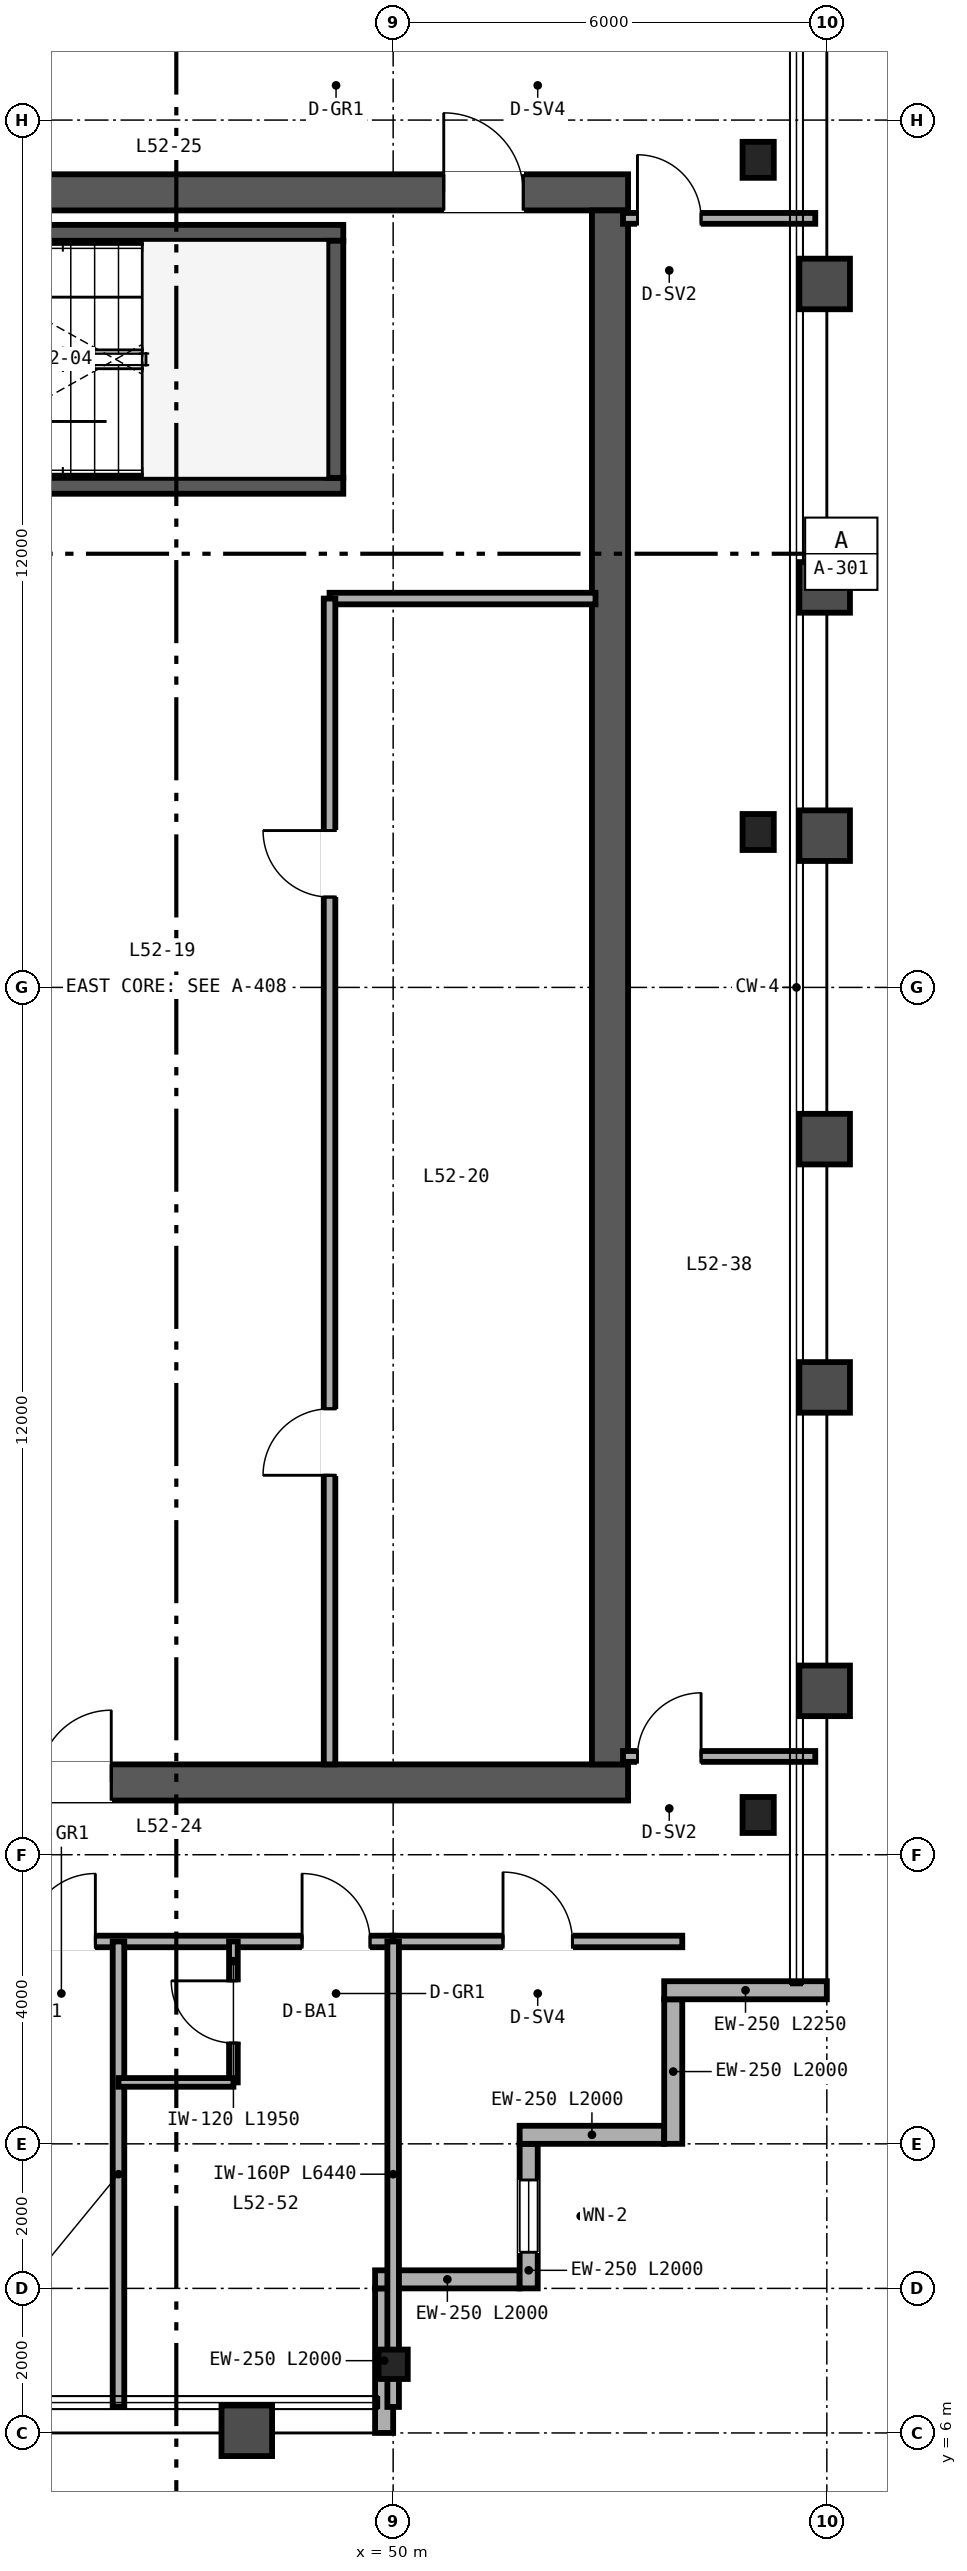
"""IFC4 building model, lengths in metres.
Left out: names, types, materials, properties, quantities, classifications, styles, units other than length and angle.
Written with IfcOpenShell. Run it as: python <this file> out.ifc"""

import sys

from ifc_helpers import new_model, si_unit, direction, frame, frame_2d, origin, origin_2d, place, context, subcontext, project, spatial, rectangle, i_section, extrude, source, transform, mapped, element, fill, save


model = new_model("IFC4")
c1 = context("Model", 3, precision=1e-05, world=origin(), true_north=direction((0.0, 1.0)))
c2 = subcontext(c1, "Body", "Model", "MODEL_VIEW")
j1 = project(units=[si_unit("LENGTHUNIT", "METRE"), si_unit("PLANEANGLEUNIT", "RADIAN")], contexts=[c1])
p1 = place(None, origin())
s1 = spatial("IfcSite", under=j1, at=p1, CompositionType="ELEMENT")
p2 = place(p1, origin())
s2 = spatial("IfcBuilding", under=s1, at=p2, CompositionType="ELEMENT")
p3 = place(p2, frame((0.0, 0.0, 206.4)))
s3 = spatial("IfcBuildingStorey", under=s2, at=p3, CompositionType="ELEMENT", Elevation=206.4)
p4 = place(p3, frame((40.75, 15.0, 0.0), z_axis=(0.0, 0.0, 1.0), x_axis=(1.0, 0.0, 0.0)))
e1 = element("IfcWall", 1, at=p4, inside=s3, PredefinedType="SHEAR", context=c2, shape_type="SweptSolid", body=[
    extrude(rectangle(XDim=12.5, YDim=0.5, at=frame_2d((6.25, 0.0))), origin(), (0.0, 0.0, 1.0), 3.37),
])
p5 = place(p4, frame((4.35, 0.0, 0.0)))
e2 = element("IfcOpeningElement", 2, at=p5, cuts=e1, PredefinedType="OPENING", context=c2, shape_type="SweptSolid", body=[
    extrude(rectangle(XDim=1.0, YDim=2.15, at=frame_2d((0.5, 1.075))), frame((0.0, 0.26, 0.0), z_axis=(0.0, -1.0, 0.0), x_axis=(1.0, 0.0, 0.0)), (0.0, 0.0, 1.0), 0.52),
])
p6 = place(p3, frame((40.75, 37.0, 0.0), z_axis=(0.0, 0.0, 1.0), x_axis=(1.0, 0.0, 0.0)))
e3 = element("IfcWall", 3, at=p6, inside=s3, PredefinedType="SHEAR", context=c2, shape_type="SweptSolid", body=[
    extrude(rectangle(XDim=12.5, YDim=0.5, at=frame_2d((6.25, 0.0))), origin(), (0.0, 0.0, 1.0), 3.37),
])
p7 = place(p6, frame((9.95, 0.0, 0.0)))
e4 = element("IfcOpeningElement", 4, at=p7, cuts=e3, PredefinedType="OPENING", context=c2, shape_type="SweptSolid", body=[
    extrude(rectangle(XDim=1.1, YDim=2.15, at=frame_2d((0.55, 1.075))), frame((0.0, 0.26, 0.0), z_axis=(0.0, -1.0, 0.0), x_axis=(1.0, 0.0, 0.0)), (0.0, 0.0, 1.0), 0.52),
])
p8 = place(p3, frame((53.0, 15.25, 0.0), z_axis=(0.0, 0.0, 1.0), x_axis=(0.0, 1.0, 0.0)))
e5 = element("IfcWall", 5, at=p8, inside=s3, PredefinedType="SHEAR", context=c2, shape_type="SweptSolid", body=[
    extrude(rectangle(XDim=21.5, YDim=0.5, at=frame_2d((10.75, 0.0))), origin(), (0.0, 0.0, 1.0), 3.37),
])
p9 = place(p3, frame((41.25, 32.94, 0.0), z_axis=(0.0, 0.0, 1.0), x_axis=(1.0, 0.0, 0.0)))
e6 = element("IfcWall", 6, at=p9, inside=s3, PredefinedType="SHEAR", context=c2, shape_type="SweptSolid", body=[
    extrude(rectangle(XDim=8.06, YDim=0.22, at=frame_2d((4.03, 0.0))), origin(), (0.0, 0.0, 1.0), 3.4),
])
p10 = place(p9, frame((0.67, 0.0, 0.0)))
e7 = element("IfcOpeningElement", 7, at=p10, cuts=e6, PredefinedType="OPENING", context=c2, shape_type="SweptSolid", body=[
    extrude(rectangle(XDim=1.05, YDim=2.15, at=frame_2d((0.525, 1.075))), frame((0.0, 0.12, 0.0), z_axis=(0.0, -1.0, 0.0), x_axis=(1.0, 0.0, 0.0)), (0.0, 0.0, 1.0), 0.24),
])
p11 = place(p3, frame((41.25, 36.44, 0.0), z_axis=(0.0, 0.0, 1.0), x_axis=(1.0, 0.0, 0.0)))
e8 = element("IfcWall", 8, at=p11, inside=s3, PredefinedType="SHEAR", context=c2, shape_type="SweptSolid", body=[
    extrude(rectangle(XDim=8.06, YDim=0.22, at=frame_2d((4.03, 0.0))), origin(), (0.0, 0.0, 1.0), 3.4),
])
p12 = place(p3, frame((49.2, 33.05, 0.0), z_axis=(0.0, 0.0, 1.0), x_axis=(0.0, 1.0, 0.0)))
e9 = element("IfcWall", 9, at=p12, inside=s3, PredefinedType="SHEAR", context=c2, shape_type="SweptSolid", body=[
    extrude(rectangle(XDim=3.28, YDim=0.22, at=frame_2d((1.64, 0.0))), origin(), (0.0, 0.0, 1.0), 3.4),
])
m1 = source(origin(), c2, "Body", "SweptSolid", [
    extrude(i_section(OverallWidth=0.432, OverallDepth=0.498, WebThickness=0.056, FlangeThickness=0.089, FilletRadius=0.025, at=origin_2d()), origin(), (0.0, 0.0, 1.0), 3.37),
])
for number, where, z_axis, x_axis in (
    (10, (55.05, 14.55, 0.0), (0.0, 0.0, 1.0), (1.0, 0.0, 0.0)),
    (11, (55.05, 28.15, 0.0), (0.0, 0.0, 1.0), (1.0, 0.0, 0.0)),
    (12, (55.05, 37.45, 0.0), (0.0, 0.0, 1.0), (1.0, 0.0, 0.0)),
):
    element("IfcColumn", number, at=place(p3, frame(where, z_axis=z_axis, x_axis=x_axis)), inside=s3, PredefinedType="COLUMN", context=c2, shape_type="MappedRepresentation", body=[
        mapped(m1, transform((0.0, 0.0, 0.0), scale=1.0)),
    ])
m2 = source(origin(), c2, "Body", "SweptSolid", [
    extrude(i_section(OverallWidth=0.404, OverallDepth=0.407, WebThickness=0.027, FlangeThickness=0.044, FilletRadius=0.025, at=origin_2d()), origin(), (0.0, 0.0, 1.0), 3.37),
])
p13 = place(p3, frame((50.0, 6.95, 0.0), z_axis=(0.0, 0.0, 1.0), x_axis=(1.0, 0.0, 0.0)))
e13 = element("IfcColumn", 13, at=p13, inside=s3, PredefinedType="COLUMN", context=c2, shape_type="MappedRepresentation", body=[
    mapped(m2, transform((0.0, 0.0, 0.0), scale=1.0)),
])
p14 = place(p3, frame((49.875, 6.0, 0.0), z_axis=(0.0, 0.0, 1.0), x_axis=(0.0, 1.0, 0.0)))
e14 = element("IfcWall", 14, at=p14, inside=s3, PredefinedType="SOLIDWALL", context=c2, shape_type="SweptSolid", body=[
    extrude(rectangle(XDim=2.0, YDim=0.25, at=frame_2d((1.0, 0.0))), origin(), (0.0, 0.0, 1.0), 2.677),
])
p15 = place(p3, frame((49.75, 8.125, 0.0), z_axis=(0.0, 0.0, 1.0), x_axis=(1.0, 0.0, 0.0)))
e15 = element("IfcWall", 15, at=p15, inside=s3, PredefinedType="SOLIDWALL", context=c2, shape_type="SweptSolid", body=[
    extrude(rectangle(XDim=2.0, YDim=0.25, at=frame_2d((1.0, 0.0))), origin(), (0.0, 0.0, 1.0), 3.37),
])
p16 = place(p3, frame((51.875, 8.0, 0.0), z_axis=(0.0, 0.0, 1.0), x_axis=(0.0, 1.0, 0.0)))
e16 = element("IfcWall", 16, at=p16, inside=s3, PredefinedType="SOLIDWALL", context=c2, shape_type="SweptSolid", body=[
    extrude(rectangle(XDim=2.0, YDim=0.25, at=frame_2d((1.0, 0.0))), origin(), (0.0, 0.0, 1.0), 3.37),
])
p17 = place(p16, frame((0.5, 0.0, 0.85)))
e17 = element("IfcOpeningElement", 17, at=p17, cuts=e16, PredefinedType="OPENING", context=c2, shape_type="SweptSolid", body=[
    extrude(rectangle(XDim=1.0, YDim=1.9, at=frame_2d((0.5, 0.95))), frame((0.0, 0.135, 0.0), z_axis=(0.0, -1.0, 0.0), x_axis=(1.0, 0.0, 0.0)), (0.0, 0.0, 1.0), 0.27),
])
for number, where, z_axis, x_axis in (
    (18, (51.75, 10.125, 0.0), (0.0, 0.0, 1.0), (1.0, 0.0, 0.0)),
    (19, (53.875, 10.0, 0.0), (0.0, 0.0, 1.0), (0.0, 1.0, 0.0)),
):
    element("IfcWall", number, at=place(p3, frame(where, z_axis=z_axis, x_axis=x_axis)), inside=s3, PredefinedType="SOLIDWALL", context=c2, shape_type="SweptSolid", body=[
        extrude(rectangle(XDim=2.0, YDim=0.25, at=frame_2d((1.0, 0.0))), origin(), (0.0, 0.0, 1.0), 3.37),
    ])
p18 = place(p3, frame((53.75, 12.125, 0.0), z_axis=(0.0, 0.0, 1.0), x_axis=(1.0, 0.0, 0.0)))
e20 = element("IfcWall", 20, at=p18, inside=s3, PredefinedType="SOLIDWALL", context=c2, shape_type="SweptSolid", body=[
    extrude(rectangle(XDim=2.25, YDim=0.25, at=frame_2d((1.125, 0.0))), origin(), (0.0, 0.0, 1.0), 3.37),
])
p19 = place(p3, frame((49.12, 31.38, 0.0), z_axis=(0.0, 0.0, 1.0), x_axis=(1.0, 0.0, 0.0)))
e21 = element("IfcWall", 21, at=p19, inside=s3, PredefinedType="PARTITIONING", context=c2, shape_type="SweptSolid", body=[
    extrude(rectangle(XDim=3.68, YDim=0.16, at=frame_2d((1.84, 0.0))), origin(), (0.0, 0.0, 1.0), 2.47),
])
p20 = place(p3, frame((49.12, 15.25, 0.0), z_axis=(0.0, 0.0, 1.0), x_axis=(0.0, 1.0, 0.0)))
e22 = element("IfcWall", 22, at=p20, inside=s3, PredefinedType="PARTITIONING", context=c2, shape_type="SweptSolid", body=[
    extrude(rectangle(XDim=16.13, YDim=0.16, at=frame_2d((8.065, 0.0))), origin(), (0.0, 0.0, 1.0), 2.443),
])
p21 = place(p20, frame((4.0, 0.0, 0.0)))
e23 = element("IfcOpeningElement", 23, at=p21, cuts=e22, PredefinedType="OPENING", context=c2, shape_type="SweptSolid", body=[
    extrude(rectangle(XDim=0.92, YDim=2.15, at=frame_2d((0.46, 1.075))), frame((0.0, 0.09, 0.0), z_axis=(0.0, -1.0, 0.0), x_axis=(1.0, 0.0, 0.0)), (0.0, 0.0, 1.0), 0.18),
])
p22 = place(p20, frame((12.0, 0.0, 0.0)))
e24 = element("IfcOpeningElement", 24, at=p22, cuts=e22, PredefinedType="OPENING", context=c2, shape_type="SweptSolid", body=[
    extrude(rectangle(XDim=0.92, YDim=2.15, at=frame_2d((0.46, 1.075))), frame((0.0, 0.09, 0.0), z_axis=(0.0, -1.0, 0.0), x_axis=(1.0, 0.0, 0.0)), (0.0, 0.0, 1.0), 0.18),
])
p23 = place(p3, frame((53.18, 15.36, 0.0), z_axis=(0.0, 0.0, 1.0), x_axis=(1.0, 0.0, 0.0)))
e25 = element("IfcWall", 25, at=p23, inside=s3, PredefinedType="PARTITIONING", context=c2, shape_type="SweptSolid", body=[
    extrude(rectangle(XDim=2.66, YDim=0.15, at=frame_2d((1.33, 0.0))), origin(), (0.0, 0.0, 1.0), 2.591),
])
p24 = place(p23, frame((0.2, 0.0, 0.0)))
e26 = element("IfcOpeningElement", 26, at=p24, cuts=e25, PredefinedType="OPENING", context=c2, shape_type="SweptSolid", body=[
    extrude(rectangle(XDim=0.88, YDim=2.15, at=frame_2d((0.44, 1.075))), frame((0.0, 0.085, 0.0), z_axis=(0.0, -1.0, 0.0), x_axis=(1.0, 0.0, 0.0)), (0.0, 0.0, 1.0), 0.17),
])
p25 = place(p3, frame((53.18, 36.64, 0.0), z_axis=(0.0, 0.0, 1.0), x_axis=(1.0, 0.0, 0.0)))
e27 = element("IfcWall", 27, at=p25, inside=s3, PredefinedType="PARTITIONING", context=c2, shape_type="SweptSolid", body=[
    extrude(rectangle(XDim=2.66, YDim=0.15, at=frame_2d((1.33, 0.0))), origin(), (0.0, 0.0, 1.0), 2.753),
])
p26 = place(p25, frame((0.2, 0.0, 0.0)))
e28 = element("IfcOpeningElement", 28, at=p26, cuts=e27, PredefinedType="OPENING", context=c2, shape_type="SweptSolid", body=[
    extrude(rectangle(XDim=0.88, YDim=2.15, at=frame_2d((0.44, 1.075))), frame((0.0, 0.085, 0.0), z_axis=(0.0, -1.0, 0.0), x_axis=(1.0, 0.0, 0.0)), (0.0, 0.0, 1.0), 0.17),
])
p27 = place(p3, frame((50.0, 12.8, 0.0), z_axis=(0.0, 0.0, 1.0), x_axis=(1.0, 0.0, 0.0)))
e29 = element("IfcWall", 29, at=p27, inside=s3, PredefinedType="PARTITIONING", context=c2, shape_type="SweptSolid", body=[
    extrude(rectangle(XDim=4.0, YDim=0.16, at=frame_2d((2.0, 0.0))), origin(), (0.0, 0.0, 1.0), 3.37),
])
p28 = place(p27, frame((1.52, 0.0, 0.0)))
e30 = element("IfcOpeningElement", 30, at=p28, cuts=e29, PredefinedType="OPENING", context=c2, shape_type="SweptSolid", body=[
    extrude(rectangle(XDim=0.96, YDim=2.15, at=frame_2d((0.48, 1.075))), frame((0.0, 0.09, 0.0), z_axis=(0.0, -1.0, 0.0), x_axis=(1.0, 0.0, 0.0)), (0.0, 0.0, 1.0), 0.18),
])
p29 = place(p3, frame((38.0, 12.8, 0.0), z_axis=(0.0, 0.0, 1.0), x_axis=(1.0, 0.0, 0.0)))
e31 = element("IfcWall", 31, at=p29, inside=s3, PredefinedType="PARTITIONING", context=c2, shape_type="SweptSolid", body=[
    extrude(rectangle(XDim=12.0, YDim=0.16, at=frame_2d((6.0, 0.0))), origin(), (0.0, 0.0, 1.0), 2.913),
])
p30 = place(p29, frame((3.14, 0.0, 0.0)))
e32 = element("IfcOpeningElement", 32, at=p30, cuts=e31, PredefinedType="OPENING", context=c2, shape_type="SweptSolid", body=[
    extrude(rectangle(XDim=0.94, YDim=2.15, at=frame_2d((0.47, 1.075))), frame((0.0, 0.09, 0.0), z_axis=(0.0, -1.0, 0.0), x_axis=(1.0, 0.0, 0.0)), (0.0, 0.0, 1.0), 0.18),
])
p31 = place(p29, frame((6.94, 0.0, 0.0)))
e33 = element("IfcOpeningElement", 33, at=p31, cuts=e31, PredefinedType="OPENING", context=c2, shape_type="SweptSolid", body=[
    extrude(rectangle(XDim=0.94, YDim=2.15, at=frame_2d((0.47, 1.075))), frame((0.0, 0.09, 0.0), z_axis=(0.0, -1.0, 0.0), x_axis=(1.0, 0.0, 0.0)), (0.0, 0.0, 1.0), 0.18),
])
p32 = place(p29, frame((10.74, 0.0, 0.0)))
e34 = element("IfcOpeningElement", 34, at=p32, cuts=e31, PredefinedType="OPENING", context=c2, shape_type="SweptSolid", body=[
    extrude(rectangle(XDim=0.94, YDim=2.15, at=frame_2d((0.47, 1.075))), frame((0.0, 0.09, 0.0), z_axis=(0.0, -1.0, 0.0), x_axis=(1.0, 0.0, 0.0)), (0.0, 0.0, 1.0), 0.18),
])
for number, where, z_axis, x_axis in (
    (35, (50.0, 6.36, 0.0), (0.0, 0.0, 1.0), (0.0, 1.0, 0.0)),
    (36, (46.2, 6.36, 0.0), (0.0, 0.0, 1.0), (0.0, 1.0, 0.0)),
):
    element("IfcWall", number, at=place(p3, frame(where, z_axis=z_axis, x_axis=x_axis)), inside=s3, PredefinedType="PARTITIONING", context=c2, shape_type="SweptSolid", body=[
        extrude(rectangle(XDim=6.44, YDim=0.16, at=frame_2d((3.22, 0.0))), origin(), (0.0, 0.0, 1.0), 2.677),
    ])
p33 = place(p3, frame((47.79, 10.85, 0.0), z_axis=(0.0, 0.0, 1.0), x_axis=(0.0, 1.0, 0.0)))
e37 = element("IfcWall", 37, at=p33, inside=s3, PredefinedType="PARTITIONING", context=c2, shape_type="SweptSolid", body=[
    extrude(rectangle(XDim=1.95, YDim=0.12, at=frame_2d((0.975, 0.0))), origin(), (0.0, 0.0, 1.0), 3.37),
])
p34 = place(p33, frame((0.545, 0.0, 0.0)))
e38 = element("IfcOpeningElement", 38, at=p34, cuts=e37, PredefinedType="OPENING", context=c2, shape_type="SweptSolid", body=[
    extrude(rectangle(XDim=0.86, YDim=2.1, at=frame_2d((0.43, 1.05))), frame((0.0, 0.07, 0.0), z_axis=(0.0, -1.0, 0.0), x_axis=(1.0, 0.0, 0.0)), (0.0, 0.0, 1.0), 0.14),
])
p35 = place(p3, frame((46.2, 10.85, 0.0), z_axis=(0.0, 0.0, 1.0), x_axis=(1.0, 0.0, 0.0)))
e39 = element("IfcWall", 39, at=p35, inside=s3, PredefinedType="PARTITIONING", context=c2, shape_type="SweptSolid", body=[
    extrude(rectangle(XDim=1.59, YDim=0.12, at=frame_2d((0.795, 0.0))), origin(), (0.0, 0.0, 1.0), 3.37),
])
m3 = source(origin(), c2, "Body", "SweptSolid", [
    extrude(rectangle(XDim=1.0, YDim=1.9, at=frame_2d((0.5, 0.95))), frame((0.0, 0.03, 0.0), z_axis=(0.0, -1.0, 0.0), x_axis=(1.0, 0.0, 0.0)), (0.0, 0.0, 1.0), 0.06),
])
p36 = place(p17, origin())
e40 = element("IfcWindow", 40, at=p36, inside=s3, PartitioningType="SINGLE_PANEL", PredefinedType="WINDOW", context=c2, shape_type="MappedRepresentation", body=[
    mapped(m3, transform((0.0, 0.0, 0.0), scale=1.0)),
])
fill(e17, e40)
m4 = source(origin(), c2, "Body", "SweptSolid", [
    extrude(rectangle(XDim=1.0, YDim=2.15, at=frame_2d((0.5, 1.075))), frame((0.0, 0.025, 0.0), z_axis=(0.0, -1.0, 0.0), x_axis=(1.0, 0.0, 0.0)), (0.0, 0.0, 1.0), 0.05),
])
p37 = place(p5, origin())
e41 = element("IfcDoor", 41, at=p37, inside=s3, OperationType="SINGLE_SWING_RIGHT", PredefinedType="DOOR", context=c2, shape_type="MappedRepresentation", body=[
    mapped(m4, transform((0.0, 0.0, 0.0), scale=1.0)),
])
fill(e2, e41)
m5 = source(origin(), c2, "Body", "SweptSolid", [
    extrude(rectangle(XDim=1.1, YDim=2.15, at=frame_2d((0.55, 1.075))), frame((0.0, 0.025, 0.0), z_axis=(0.0, -1.0, 0.0), x_axis=(1.0, 0.0, 0.0)), (0.0, 0.0, 1.0), 0.05),
])
p38 = place(p7, origin())
e42 = element("IfcDoor", 42, at=p38, inside=s3, OperationType="SINGLE_SWING_LEFT", PredefinedType="DOOR", context=c2, shape_type="MappedRepresentation", body=[
    mapped(m5, transform((0.0, 0.0, 0.0), scale=1.0)),
])
fill(e4, e42)
m6 = source(origin(), c2, "Body", "SweptSolid", [
    extrude(rectangle(XDim=0.92, YDim=2.15, at=frame_2d((0.46, 1.075))), frame((0.0, 0.025, 0.0), z_axis=(0.0, -1.0, 0.0), x_axis=(1.0, 0.0, 0.0)), (0.0, 0.0, 1.0), 0.05),
])
p39 = place(p21, origin())
e43 = element("IfcDoor", 43, at=p39, inside=s3, OperationType="SINGLE_SWING_LEFT", PredefinedType="DOOR", context=c2, shape_type="MappedRepresentation", body=[
    mapped(m6, transform((0.0, 0.0, 0.0), scale=1.0)),
])
fill(e23, e43)
p40 = place(p22, origin())
e44 = element("IfcDoor", 44, at=p40, inside=s3, OperationType="SINGLE_SWING_RIGHT", PredefinedType="DOOR", context=c2, shape_type="MappedRepresentation", body=[
    mapped(m6, transform((0.0, 0.0, 0.0), scale=1.0)),
])
fill(e24, e44)
m7 = source(origin(), c2, "Body", "SweptSolid", [
    extrude(rectangle(XDim=0.88, YDim=2.15, at=frame_2d((0.44, 1.075))), frame((0.0, 0.025, 0.0), z_axis=(0.0, -1.0, 0.0), x_axis=(1.0, 0.0, 0.0)), (0.0, 0.0, 1.0), 0.05),
])
p41 = place(p24, origin())
e45 = element("IfcDoor", 45, at=p41, inside=s3, OperationType="SINGLE_SWING_RIGHT", PredefinedType="DOOR", context=c2, shape_type="MappedRepresentation", body=[
    mapped(m7, transform((0.0, 0.0, 0.0), scale=1.0)),
])
fill(e26, e45)
p42 = place(p26, origin())
e46 = element("IfcDoor", 46, at=p42, inside=s3, OperationType="SINGLE_SWING_LEFT", PredefinedType="DOOR", context=c2, shape_type="MappedRepresentation", body=[
    mapped(m7, transform((0.0, 0.0, 0.0), scale=1.0)),
])
fill(e28, e46)
m8 = source(origin(), c2, "Body", "SweptSolid", [
    extrude(rectangle(XDim=0.96, YDim=2.15, at=frame_2d((0.48, 1.075))), frame((0.0, 0.025, 0.0), z_axis=(0.0, -1.0, 0.0), x_axis=(1.0, 0.0, 0.0)), (0.0, 0.0, 1.0), 0.05),
])
p43 = place(p28, origin())
e47 = element("IfcDoor", 47, at=p43, inside=s3, OperationType="SINGLE_SWING_LEFT", PredefinedType="DOOR", context=c2, shape_type="MappedRepresentation", body=[
    mapped(m8, transform((0.0, 0.0, 0.0), scale=1.0)),
])
fill(e30, e47)
m9 = source(origin(), c2, "Body", "SweptSolid", [
    extrude(rectangle(XDim=0.86, YDim=2.1, at=frame_2d((0.43, 1.05))), frame((0.0, 0.025, 0.0), z_axis=(0.0, -1.0, 0.0), x_axis=(1.0, 0.0, 0.0)), (0.0, 0.0, 1.0), 0.05),
])
p44 = place(p34, origin())
e48 = element("IfcDoor", 48, at=p44, inside=s3, OperationType="SINGLE_SWING_RIGHT", PredefinedType="DOOR", context=c2, shape_type="MappedRepresentation", body=[
    mapped(m9, transform((0.0, 0.0, 0.0), scale=1.0)),
])
fill(e38, e48)
m10 = source(origin(), c2, "Body", "SweptSolid", [
    extrude(rectangle(XDim=0.94, YDim=2.15, at=frame_2d((0.47, 1.075))), frame((0.0, 0.025, 0.0), z_axis=(0.0, -1.0, 0.0), x_axis=(1.0, 0.0, 0.0)), (0.0, 0.0, 1.0), 0.05),
])
p45 = place(p31, origin())
e49 = element("IfcDoor", 49, at=p45, inside=s3, OperationType="SINGLE_SWING_RIGHT", PredefinedType="DOOR", context=c2, shape_type="MappedRepresentation", body=[
    mapped(m10, transform((0.0, 0.0, 0.0), scale=1.0)),
])
fill(e33, e49)
p46 = place(p32, origin())
e50 = element("IfcDoor", 50, at=p46, inside=s3, OperationType="SINGLE_SWING_LEFT", PredefinedType="DOOR", context=c2, shape_type="MappedRepresentation", body=[
    mapped(m10, transform((0.0, 0.0, 0.0), scale=1.0)),
])
fill(e34, e50)
save(model, sys.argv[1])
